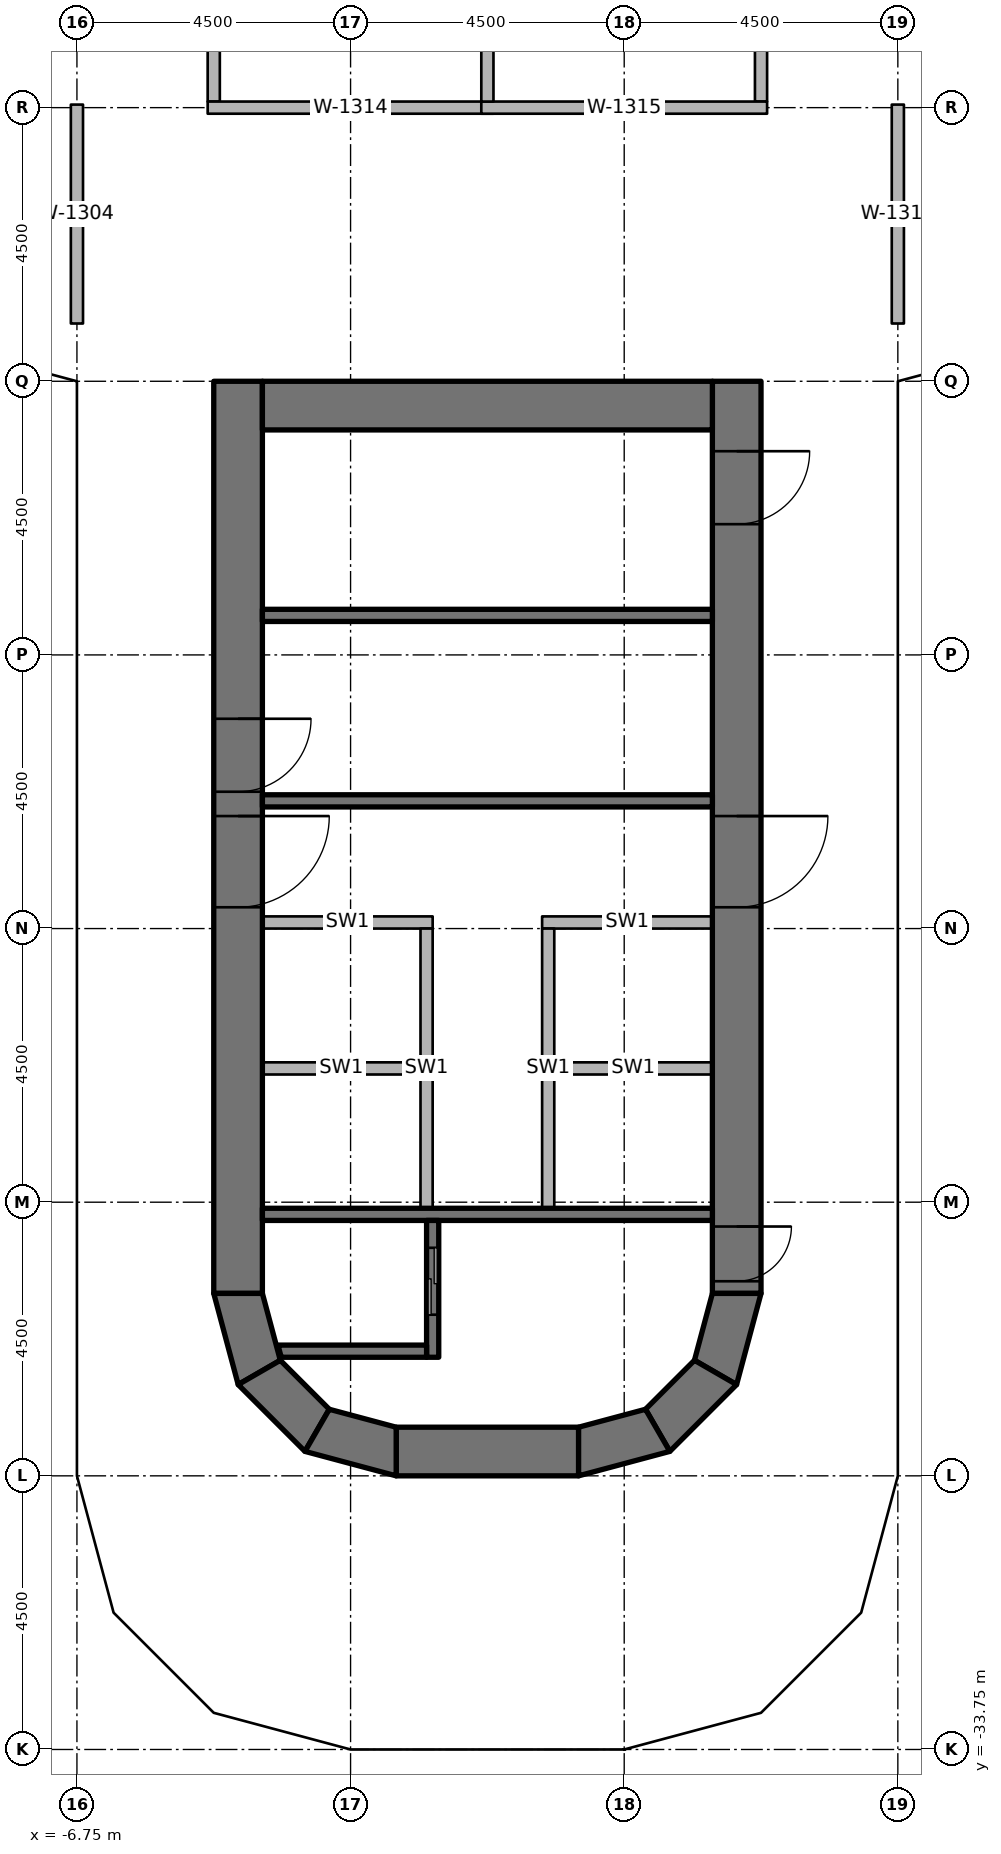
"""IFC4 building model, lengths in metres.
Left out: names, types, materials, properties, quantities, classifications, styles, units other than length and angle.
Written with IfcOpenShell. Run it as: python <this file> out.ifc"""

import sys

from ifc_helpers import new_model, si_unit, direction, frame, frame_2d, origin, origin_2d, place, context, subcontext, project, spatial, polyline, rectangle, outline, extrude, element, fill, save


model = new_model("IFC4")
c1 = context("Model", 3, precision=1e-05, world=origin(), true_north=direction((0.0, 1.0)))
c2 = subcontext(c1, "Body", "Model", "MODEL_VIEW")
j1 = project(units=[si_unit("LENGTHUNIT", "METRE"), si_unit("PLANEANGLEUNIT", "RADIAN")], contexts=[c1])
p1 = place(None, origin())
s1 = spatial("IfcSite", under=j1, at=p1, CompositionType="ELEMENT")
p2 = place(p1, origin())
s2 = spatial("IfcBuilding", under=s1, at=p2, CompositionType="ELEMENT")
p3 = place(p2, frame((0.0, 0.0, 132.2)))
s3 = spatial("IfcBuildingStorey", under=s2, at=p3, CompositionType="ELEMENT", Elevation=132.2)
for number, where, z_axis, x_axis in (
    (1, (-6.25, -26.9, 0.0), (0.0, 0.0, 1.0), (1.0, 0.0, 0.0)),
    (2, (-6.25, -24.65, 0.0), (0.0, 0.0, 1.0), (1.0, 0.0, 0.0)),
    (3, (-6.25, -20.25, 0.0), (0.0, 0.0, 1.0), (1.0, 0.0, 0.0)),
    (4, (-6.25, -15.75, 0.0), (0.0, 0.0, 1.0), (1.0, 0.0, 0.0)),
    (5, (-6.25, -10.75, 0.0), (0.0, 0.0, 1.0), (1.0, 0.0, 0.0)),
    (6, (-6.25, -6.25, 0.0), (0.0, 0.0, 1.0), (1.0, 0.0, 0.0)),
    (7, (-2.25, -33.11, 0.0), (0.0, 0.0, 1.0), (1.0, 0.0, 0.0)),
    (8, (2.25, -33.11, 0.0), (0.0, 0.0, 1.0), (1.0, 0.0, 0.0)),
    (9, (6.25, -26.9, 0.0), (0.0, 0.0, 1.0), (1.0, 0.0, 0.0)),
    (10, (6.25, -24.65, 0.0), (0.0, 0.0, 1.0), (1.0, 0.0, 0.0)),
    (11, (6.25, -20.25, 0.0), (0.0, 0.0, 1.0), (1.0, 0.0, 0.0)),
    (12, (6.25, -15.75, 0.0), (0.0, 0.0, 1.0), (1.0, 0.0, 0.0)),
    (13, (6.25, -10.75, 0.0), (0.0, 0.0, 1.0), (1.0, 0.0, 0.0)),
    (14, (6.25, -6.25, 0.0), (0.0, 0.0, 1.0), (1.0, 0.0, 0.0)),
):
    element("IfcColumn", number, at=place(p3, frame(where, z_axis=z_axis, x_axis=x_axis)), inside=s3, PredefinedType="COLUMN", context=c2, shape_type="SweptSolid", body=[
        extrude(rectangle(XDim=0.9, YDim=0.9, at=origin_2d()), origin(), (0.0, 0.0, 1.0), 3.65),
    ])
p4 = place(p3, frame((-4.1, -11.25, 0.0), z_axis=(0.0, 0.0, 1.0), x_axis=(0.0, -1.0, 0.0)))
e15 = element("IfcWall", 15, at=p4, inside=s3, PredefinedType="SHEAR", context=c2, shape_type="SweptSolid", body=[
    extrude(rectangle(XDim=15.0, YDim=0.8, at=frame_2d((7.5, 0.0))), origin(), (0.0, 0.0, 1.0), 3.8),
])
p5 = place(p4, frame((7.15, 0.0, 0.0)))
e16 = element("IfcOpeningElement", 16, at=p5, cuts=e15, PredefinedType="OPENING", context=c2, shape_type="SweptSolid", body=[
    extrude(rectangle(XDim=1.5, YDim=2.3, at=frame_2d((0.75, 1.15))), frame((0.0, 0.41, 0.0), z_axis=(0.0, -1.0, 0.0), x_axis=(1.0, 0.0, 0.0)), (0.0, 0.0, 1.0), 0.82),
])
p6 = place(p4, frame((5.55, 0.0, 0.0)))
e17 = element("IfcOpeningElement", 17, at=p6, cuts=e15, PredefinedType="OPENING", context=c2, shape_type="SweptSolid", body=[
    extrude(rectangle(XDim=1.2, YDim=2.1, at=frame_2d((0.6, 1.05))), frame((0.0, 0.41, 0.0), z_axis=(0.0, -1.0, 0.0), x_axis=(1.0, 0.0, 0.0)), (0.0, 0.0, 1.0), 0.82),
])
p7 = place(p3, frame((4.1, -11.25, 0.0), z_axis=(0.0, 0.0, 1.0), x_axis=(0.0, -1.0, 0.0)))
e18 = element("IfcWall", 18, at=p7, inside=s3, PredefinedType="SHEAR", context=c2, shape_type="SweptSolid", body=[
    extrude(rectangle(XDim=15.0, YDim=0.8, at=frame_2d((7.5, 0.0))), origin(), (0.0, 0.0, 1.0), 3.8),
])
p8 = place(p7, frame((7.15, 0.0, 0.0)))
e19 = element("IfcOpeningElement", 19, at=p8, cuts=e18, PredefinedType="OPENING", context=c2, shape_type="SweptSolid", body=[
    extrude(rectangle(XDim=1.5, YDim=2.3, at=frame_2d((0.75, 1.15))), frame((0.0, 0.41, 0.0), z_axis=(0.0, -1.0, 0.0), x_axis=(1.0, 0.0, 0.0)), (0.0, 0.0, 1.0), 0.82),
])
p9 = place(p7, frame((13.9, 0.0, 0.0)))
e20 = element("IfcOpeningElement", 20, at=p9, cuts=e18, PredefinedType="OPENING", context=c2, shape_type="SweptSolid", body=[
    extrude(rectangle(XDim=0.9, YDim=2.1, at=frame_2d((0.45, 1.05))), frame((0.0, 0.41, 0.0), z_axis=(0.0, -1.0, 0.0), x_axis=(1.0, 0.0, 0.0)), (0.0, 0.0, 1.0), 0.82),
])
p10 = place(p7, frame((1.15, 0.0, 0.0)))
e21 = element("IfcOpeningElement", 21, at=p10, cuts=e18, PredefinedType="OPENING", context=c2, shape_type="SweptSolid", body=[
    extrude(rectangle(XDim=1.2, YDim=2.1, at=frame_2d((0.6, 1.05))), frame((0.0, 0.41, 0.0), z_axis=(0.0, -1.0, 0.0), x_axis=(1.0, 0.0, 0.0)), (0.0, 0.0, 1.0), 0.82),
])
p11 = place(p3, frame((-3.7, -11.65, 0.0), z_axis=(0.0, 0.0, 1.0), x_axis=(1.0, 0.0, 0.0)))
e22 = element("IfcWall", 22, at=p11, inside=s3, PredefinedType="SHEAR", context=c2, shape_type="SweptSolid", body=[
    extrude(rectangle(XDim=7.4, YDim=0.8, at=frame_2d((3.7, 0.0))), origin(), (0.0, 0.0, 1.0), 3.8),
])
p12 = place(p3, frame((-1.5, -28.85, 0.0), z_axis=(0.0, 0.0, 1.0), x_axis=(1.0, 0.0, 0.0)))
e23 = element("IfcWall", 23, at=p12, inside=s3, PredefinedType="SHEAR", context=c2, shape_type="SweptSolid", body=[
    extrude(rectangle(XDim=3.0, YDim=0.8, at=frame_2d((1.5, 0.0))), origin(), (0.0, 0.0, 1.0), 3.8),
])
p13 = place(p3, origin())
e24 = element("IfcWall", 24, at=p13, inside=s3, PredefinedType="SHEAR", context=c2, shape_type="SweptSolid", body=[
    extrude(outline(polyline([(-4.5, -26.25), (-4.098, -27.75), (-3.405, -27.35), (-3.7, -26.25), (-4.5, -26.25)])), origin(), (0.0, 0.0, 1.0), 3.8),
])
p14 = place(p3, origin())
e25 = element("IfcWall", 25, at=p14, inside=s3, PredefinedType="SHEAR", context=c2, shape_type="SweptSolid", body=[
    extrude(outline(polyline([(-4.098, -27.75), (-3.0, -28.848), (-2.6, -28.155), (-3.405, -27.35), (-4.098, -27.75)])), origin(), (0.0, 0.0, 1.0), 3.8),
])
p15 = place(p3, origin())
e26 = element("IfcWall", 26, at=p15, inside=s3, PredefinedType="SHEAR", context=c2, shape_type="SweptSolid", body=[
    extrude(outline(polyline([(-3.0, -28.848), (-1.5, -29.25), (-1.5, -28.45), (-2.6, -28.155), (-3.0, -28.848)])), origin(), (0.0, 0.0, 1.0), 3.8),
])
p16 = place(p3, origin())
e27 = element("IfcWall", 27, at=p16, inside=s3, PredefinedType="SHEAR", context=c2, shape_type="SweptSolid", body=[
    extrude(outline(polyline([(4.5, -26.25), (4.098, -27.75), (3.405, -27.35), (3.7, -26.25), (4.5, -26.25)])), origin(), (0.0, 0.0, 1.0), 3.8),
])
p17 = place(p3, origin())
e28 = element("IfcWall", 28, at=p17, inside=s3, PredefinedType="SHEAR", context=c2, shape_type="SweptSolid", body=[
    extrude(outline(polyline([(4.098, -27.75), (3.0, -28.848), (2.6, -28.155), (3.405, -27.35), (4.098, -27.75)])), origin(), (0.0, 0.0, 1.0), 3.8),
])
p18 = place(p3, origin())
e29 = element("IfcWall", 29, at=p18, inside=s3, PredefinedType="SHEAR", context=c2, shape_type="SweptSolid", body=[
    extrude(outline(polyline([(3.0, -28.848), (1.5, -29.25), (1.5, -28.45), (2.6, -28.155), (3.0, -28.848)])), origin(), (0.0, 0.0, 1.0), 3.8),
])
p19 = place(p3, frame((3.7, -24.95, 0.0), z_axis=(0.0, 0.0, 1.0), x_axis=(-1.0, 0.0, 0.0)))
e30 = element("IfcWall", 30, at=p19, inside=s3, PredefinedType="SHEAR", context=c2, shape_type="SweptSolid", body=[
    extrude(rectangle(XDim=7.4, YDim=0.2, at=frame_2d((3.7, 0.0))), origin(), (0.0, 0.0, 1.0), 3.65),
])
p20 = place(p3, frame((-0.9, -27.3, 0.0), z_axis=(0.0, 0.0, 1.0), x_axis=(0.0, 1.0, 0.0)))
e31 = element("IfcWall", 31, at=p20, inside=s3, PredefinedType="SHEAR", context=c2, shape_type="SweptSolid", body=[
    extrude(rectangle(XDim=2.25, YDim=0.2, at=frame_2d((1.125, 0.0))), origin(), (0.0, 0.0, 1.0), 3.65),
])
p21 = place(p20, frame((0.7, 0.0, 0.0)))
e32 = element("IfcOpeningElement", 32, at=p21, cuts=e31, PredefinedType="OPENING", context=c2, shape_type="SweptSolid", body=[
    extrude(rectangle(XDim=1.1, YDim=2.3, at=frame_2d((0.55, 1.15))), frame((0.0, 0.11, 0.0), z_axis=(0.0, -1.0, 0.0), x_axis=(1.0, 0.0, 0.0)), (0.0, 0.0, 1.0), 0.22),
])
p22 = place(p3, origin())
e33 = element("IfcWall", 33, at=p22, inside=s3, PredefinedType="SHEAR", context=c2, shape_type="SweptSolid", body=[
    extrude(outline(polyline([(-1.0, -27.1), (-3.444, -27.1), (-3.39, -27.3), (-1.0, -27.3), (-1.0, -27.1)])), origin(), (0.0, 0.0, 1.0), 3.65),
])
for number, where, z_axis, x_axis in (
    (34, (3.7, -18.15, 0.0), (0.0, 0.0, 1.0), (-1.0, 0.0, 0.0)),
    (35, (3.7, -15.1, 0.0), (0.0, 0.0, 1.0), (-1.0, 0.0, 0.0)),
):
    element("IfcWall", number, at=place(p3, frame(where, z_axis=z_axis, x_axis=x_axis)), inside=s3, PredefinedType="SHEAR", context=c2, shape_type="SweptSolid", body=[
        extrude(rectangle(XDim=7.4, YDim=0.2, at=frame_2d((3.7, 0.0))), origin(), (0.0, 0.0, 1.0), 3.65),
    ])
p23 = place(p3, frame((3.7, -20.15, 0.0), z_axis=(0.0, 0.0, 1.0), x_axis=(-1.0, 0.0, 0.0)))
e36 = element("IfcWall", 36, at=p23, inside=s3, PredefinedType="PARTITIONING", context=c2, shape_type="SweptSolid", body=[
    extrude(rectangle(XDim=2.8, YDim=0.2, at=frame_2d((1.4, 0.0))), origin(), (0.0, 0.0, 1.0), 3.65),
])
p24 = place(p3, frame((1.0, -24.85, 0.0), z_axis=(0.0, 0.0, 1.0), x_axis=(0.0, 1.0, 0.0)))
e37 = element("IfcWall", 37, at=p24, inside=s3, PredefinedType="PARTITIONING", context=c2, shape_type="SweptSolid", body=[
    extrude(rectangle(XDim=4.6, YDim=0.2, at=frame_2d((2.3, 0.0))), origin(), (0.0, 0.0, 1.0), 3.65),
])
p25 = place(p3, frame((-0.9, -20.15, 0.0), z_axis=(0.0, 0.0, 1.0), x_axis=(-1.0, 0.0, 0.0)))
e38 = element("IfcWall", 38, at=p25, inside=s3, PredefinedType="PARTITIONING", context=c2, shape_type="SweptSolid", body=[
    extrude(rectangle(XDim=2.8, YDim=0.2, at=frame_2d((1.4, 0.0))), origin(), (0.0, 0.0, 1.0), 3.65),
])
p26 = place(p3, frame((-1.0, -24.85, 0.0), z_axis=(0.0, 0.0, 1.0), x_axis=(0.0, 1.0, 0.0)))
e39 = element("IfcWall", 39, at=p26, inside=s3, PredefinedType="PARTITIONING", context=c2, shape_type="SweptSolid", body=[
    extrude(rectangle(XDim=4.6, YDim=0.2, at=frame_2d((2.3, 0.0))), origin(), (0.0, 0.0, 1.0), 3.65),
])
for number, where, z_axis, x_axis in (
    (40, (3.7, -22.55, 0.0), (0.0, 0.0, 1.0), (-1.0, 0.0, 0.0)),
    (41, (-1.1, -22.55, 0.0), (0.0, 0.0, 1.0), (-1.0, 0.0, 0.0)),
):
    element("IfcWall", number, at=place(p3, frame(where, z_axis=z_axis, x_axis=x_axis)), inside=s3, PredefinedType="PARTITIONING", context=c2, shape_type="SweptSolid", body=[
        extrude(rectangle(XDim=2.6, YDim=0.2, at=frame_2d((1.3, 0.0))), origin(), (0.0, 0.0, 1.0), 3.65),
    ])
p27 = place(p3, frame((-4.5, 6.65, 0.0), z_axis=(0.0, 0.0, 1.0), x_axis=(0.0, -1.0, 0.0)))
e42 = element("IfcWall", 42, at=p27, inside=s3, PredefinedType="PARTITIONING", context=c2, shape_type="SweptSolid", body=[
    extrude(rectangle(XDim=13.3, YDim=0.2, at=frame_2d((6.65, 0.0))), origin(), (0.0, 0.0, 1.0), 2.738),
])
p28 = place(p27, frame((6.15, 0.0, 0.0)))
e43 = element("IfcOpeningElement", 43, at=p28, cuts=e42, PredefinedType="OPENING", context=c2, shape_type="SweptSolid", body=[
    extrude(rectangle(XDim=1.0, YDim=2.1, at=frame_2d((0.5, 1.05))), frame((0.0, 0.11, 0.0), z_axis=(0.0, -1.0, 0.0), x_axis=(1.0, 0.0, 0.0)), (0.0, 0.0, 1.0), 0.22),
])
p29 = place(p3, frame((-6.75, -10.3, 0.0), z_axis=(0.0, 0.0, 1.0), x_axis=(0.0, 1.0, 0.0)))
e44 = element("IfcWall", 44, at=p29, inside=s3, PredefinedType="PARTITIONING", context=c2, shape_type="SweptSolid", body=[
    extrude(rectangle(XDim=3.6, YDim=0.2, at=frame_2d((1.8, 0.0))), origin(), (0.0, 0.0, 1.0), 2.738),
])
p30 = place(p3, frame((4.5, -6.65, 0.0), z_axis=(0.0, 0.0, 1.0), x_axis=(0.0, 1.0, 0.0)))
e45 = element("IfcWall", 45, at=p30, inside=s3, PredefinedType="PARTITIONING", context=c2, shape_type="SweptSolid", body=[
    extrude(rectangle(XDim=6.55, YDim=0.2, at=frame_2d((3.275, 0.0))), origin(), (0.0, 0.0, 1.0), 2.738),
])
p31 = place(p30, frame((2.775, 0.0, 0.0)))
e46 = element("IfcOpeningElement", 46, at=p31, cuts=e45, PredefinedType="OPENING", context=c2, shape_type="SweptSolid", body=[
    extrude(rectangle(XDim=1.0, YDim=2.1, at=frame_2d((0.5, 1.05))), frame((0.0, 0.11, 0.0), z_axis=(0.0, -1.0, 0.0), x_axis=(1.0, 0.0, 0.0)), (0.0, 0.0, 1.0), 0.22),
])
p32 = place(p3, frame((6.75, -10.3, 0.0), z_axis=(0.0, 0.0, 1.0), x_axis=(0.0, 1.0, 0.0)))
e47 = element("IfcWall", 47, at=p32, inside=s3, PredefinedType="PARTITIONING", context=c2, shape_type="SweptSolid", body=[
    extrude(rectangle(XDim=3.6, YDim=0.2, at=frame_2d((1.8, 0.0))), origin(), (0.0, 0.0, 1.0), 2.738),
])
for number, where, z_axis, x_axis in (
    (48, (-4.6, -6.75, 0.0), (0.0, 0.0, 1.0), (1.0, 0.0, 0.0)),
    (49, (-0.1, -6.75, 0.0), (0.0, 0.0, 1.0), (1.0, 0.0, 0.0)),
):
    element("IfcWall", number, at=place(p3, frame(where, z_axis=z_axis, x_axis=x_axis)), inside=s3, PredefinedType="PARTITIONING", context=c2, shape_type="SweptSolid", body=[
        extrude(rectangle(XDim=4.7, YDim=0.2, at=frame_2d((2.35, 0.0))), origin(), (0.0, 0.0, 1.0), 2.738),
    ])
p33 = place(p3, frame((0.0, -6.65, 0.0), z_axis=(0.0, 0.0, 1.0), x_axis=(0.0, 1.0, 0.0)))
e50 = element("IfcWall", 50, at=p33, inside=s3, PredefinedType="PARTITIONING", context=c2, shape_type="SweptSolid", body=[
    extrude(rectangle(XDim=6.55, YDim=0.2, at=frame_2d((3.275, 0.0))), origin(), (0.0, 0.0, 1.0), 2.738),
])
p34 = place(p8, origin())
e51 = element("IfcDoor", 51, at=p34, inside=s3, OperationType="DOUBLE_DOOR_SINGLE_SWING", PredefinedType="DOOR", context=c2, shape_type="SweptSolid", body=[
    extrude(rectangle(XDim=1.5, YDim=2.3, at=frame_2d((0.75, 1.15))), frame((0.0, 0.025, 0.0), z_axis=(0.0, -1.0, 0.0), x_axis=(1.0, 0.0, 0.0)), (0.0, 0.0, 1.0), 0.05),
])
fill(e19, e51)
p35 = place(p5, origin())
e52 = element("IfcDoor", 52, at=p35, inside=s3, OperationType="DOUBLE_DOOR_SINGLE_SWING", PredefinedType="DOOR", context=c2, shape_type="SweptSolid", body=[
    extrude(rectangle(XDim=1.5, YDim=2.3, at=frame_2d((0.75, 1.15))), frame((0.0, 0.025, 0.0), z_axis=(0.0, -1.0, 0.0), x_axis=(1.0, 0.0, 0.0)), (0.0, 0.0, 1.0), 0.05),
])
fill(e16, e52)
p36 = place(p9, origin())
e53 = element("IfcDoor", 53, at=p36, inside=s3, OperationType="SINGLE_SWING_LEFT", PredefinedType="DOOR", context=c2, shape_type="SweptSolid", body=[
    extrude(rectangle(XDim=0.9, YDim=2.1, at=frame_2d((0.45, 1.05))), frame((0.0, 0.025, 0.0), z_axis=(0.0, -1.0, 0.0), x_axis=(1.0, 0.0, 0.0)), (0.0, 0.0, 1.0), 0.05),
])
fill(e20, e53)
p37 = place(p6, origin())
e54 = element("IfcDoor", 54, at=p37, inside=s3, OperationType="SINGLE_SWING_RIGHT", PredefinedType="DOOR", context=c2, shape_type="SweptSolid", body=[
    extrude(rectangle(XDim=1.2, YDim=2.1, at=frame_2d((0.6, 1.05))), frame((0.0, 0.025, 0.0), z_axis=(0.0, -1.0, 0.0), x_axis=(1.0, 0.0, 0.0)), (0.0, 0.0, 1.0), 0.05),
])
fill(e17, e54)
p38 = place(p10, origin())
e55 = element("IfcDoor", 55, at=p38, inside=s3, OperationType="SINGLE_SWING_LEFT", PredefinedType="DOOR", context=c2, shape_type="SweptSolid", body=[
    extrude(rectangle(XDim=1.2, YDim=2.1, at=frame_2d((0.6, 1.05))), frame((0.0, 0.025, 0.0), z_axis=(0.0, -1.0, 0.0), x_axis=(1.0, 0.0, 0.0)), (0.0, 0.0, 1.0), 0.05),
])
fill(e21, e55)
p39 = place(p21, origin())
e56 = element("IfcDoor", 56, at=p39, inside=s3, OperationType="DOUBLE_DOOR_SLIDING", PredefinedType="DOOR", context=c2, shape_type="SweptSolid", body=[
    extrude(rectangle(XDim=1.1, YDim=2.3, at=frame_2d((0.55, 1.15))), frame((0.0, 0.025, 0.0), z_axis=(0.0, -1.0, 0.0), x_axis=(1.0, 0.0, 0.0)), (0.0, 0.0, 1.0), 0.05),
])
fill(e32, e56)
save(model, sys.argv[1])
